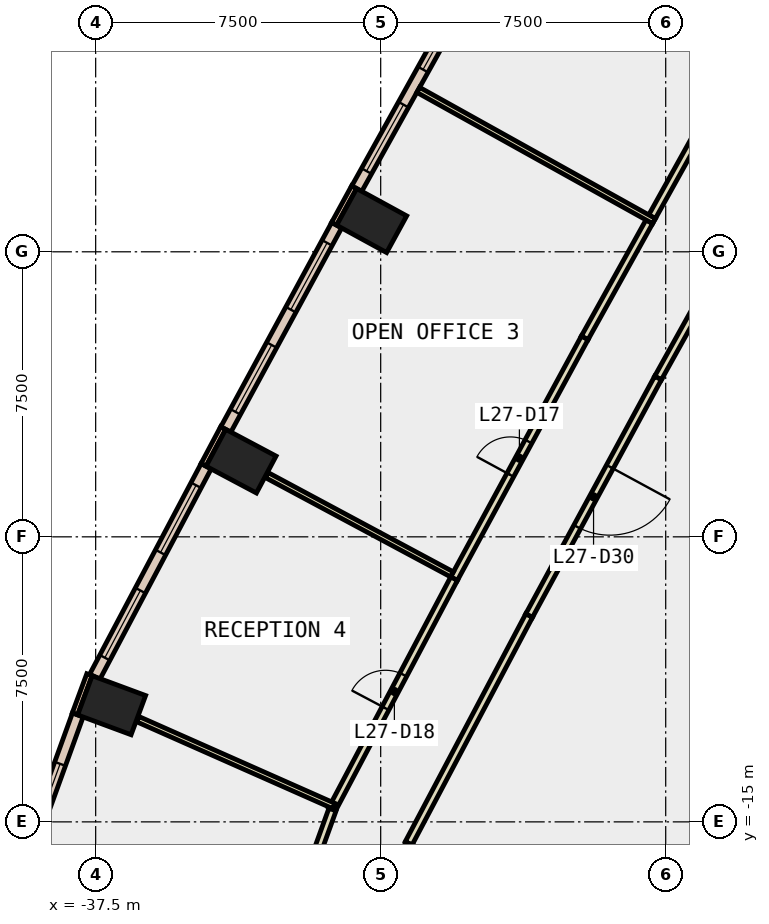
"""IFC4 building model, lengths in metres.
Left out: names, types, materials, properties, quantities, classifications, styles, units other than length and angle.
Written with IfcOpenShell. Run it as: python <this file> out.ifc"""

import sys

from ifc_helpers import new_model, si_unit, direction, frame, frame_2d, origin, origin_2d, place, context, subcontext, project, spatial, rectangle, extrude, element, fill, save


model = new_model("IFC4")
c1 = context("Model", 3, precision=1e-05, world=origin(), true_north=direction((0.0, 1.0)))
c2 = subcontext(c1, "Body", "Model", "MODEL_VIEW")
j1 = project(units=[si_unit("LENGTHUNIT", "METRE"), si_unit("PLANEANGLEUNIT", "RADIAN")], contexts=[c1])
p1 = place(None, origin())
s1 = spatial("IfcSite", under=j1, at=p1, CompositionType="ELEMENT")
p2 = place(p1, origin())
s2 = spatial("IfcBuilding", under=s1, at=p2, CompositionType="ELEMENT")
p3 = place(p2, frame((0.0, 0.0, 124.4)))
s3 = spatial("IfcBuildingStorey", under=s2, at=p3, CompositionType="ELEMENT", Elevation=124.4)
for number, where, z_axis, x_axis in (
    (1, (-30.238, 0.822, -0.4), (0.0, 0.0, 1.0), (0.48, 0.877, 0.0)),
    (2, (-33.674, -5.509, -0.4), (0.0, 0.0, 1.0), (0.469, 0.883, 0.0)),
    (3, (-37.08, -11.931, -0.4), (0.0, 0.0, 1.0), (0.347, 0.938, 0.0)),
):
    element("IfcColumn", number, at=place(p3, frame(where, z_axis=z_axis, x_axis=x_axis)), inside=s3, PredefinedType="COLUMN", context=c2, shape_type="SweptSolid", body=[
        extrude(rectangle(XDim=1.1, YDim=1.5, at=origin_2d()), origin(), (0.0, 0.0, 1.0), 4.2),
    ])
p4 = place(p3, frame((-30.698, 1.701, 0.0), z_axis=(0.0, 0.0, 1.0), x_axis=(-0.479737645119, -0.877411985247, 0.0)))
e4 = element("IfcWall", 4, at=p4, inside=s3, PredefinedType="STANDARD", context=c2, shape_type="SweptSolid", body=[
    extrude(rectangle(XDim=1.101, YDim=0.15, at=frame_2d((0.55, 0.0))), origin(), (0.0, 0.0, 1.0), 3.8),
])
p5 = place(p3, frame((-34.145, -4.637, 0.0), z_axis=(0.0, 0.0, 1.0), x_axis=(-0.46919310775, -0.883095593716, 0.0)))
e5 = element("IfcWall", 5, at=p5, inside=s3, PredefinedType="STANDARD", context=c2, shape_type="SweptSolid", body=[
    extrude(rectangle(XDim=1.099, YDim=0.15, at=frame_2d((0.55, 0.0))), origin(), (0.0, 0.0, 1.0), 3.8),
])
p6 = place(p3, frame((-37.663, -11.128, 0.0), z_axis=(0.0, 0.0, 1.0), x_axis=(-0.347010833361, -0.937861120598, 0.0)))
e6 = element("IfcWall", 6, at=p6, inside=s3, PredefinedType="STANDARD", context=c2, shape_type="SweptSolid", body=[
    extrude(rectangle(XDim=1.1, YDim=0.15, at=frame_2d((0.55, 0.0))), origin(), (0.0, 0.0, 1.0), 3.8),
])
p7 = place(p3, frame((-27.656, 7.005, 0.0), z_axis=(0.0, 0.0, 1.0), x_axis=(-0.486229342917, -0.873831234327, 0.0)))
e7 = element("IfcWall", 7, at=p7, inside=s3, PredefinedType="STANDARD", context=c2, shape_type="SweptSolid", body=[
    extrude(rectangle(XDim=6.114, YDim=0.3, at=frame_2d((3.057, 0.0))), origin(), (0.0, 0.0, 1.0), 3.8),
])
p8 = place(p7, frame((0.529, 0.0, 0.9)))
e8 = element("IfcOpeningElement", 8, at=p8, cuts=e7, PredefinedType="OPENING", context=c2, shape_type="SweptSolid", body=[
    extrude(rectangle(XDim=2.0, YDim=2.6, at=frame_2d((1.0, 1.3))), frame((0.0, 0.16, 0.0), z_axis=(0.0, -1.0, 0.0), x_axis=(1.0, 0.0, 0.0)), (0.0, 0.0, 1.0), 0.32),
])
p9 = place(p7, frame((3.586, 0.0, 0.9)))
e9 = element("IfcOpeningElement", 9, at=p9, cuts=e7, PredefinedType="OPENING", context=c2, shape_type="SweptSolid", body=[
    extrude(rectangle(XDim=2.0, YDim=2.6, at=frame_2d((1.0, 1.3))), frame((0.0, 0.16, 0.0), z_axis=(0.0, -1.0, 0.0), x_axis=(1.0, 0.0, 0.0)), (0.0, 0.0, 1.0), 0.32),
])
p10 = place(p3, frame((-31.158, 0.7, 0.0), z_axis=(0.0, 0.0, 1.0), x_axis=(-0.476982616152, -0.878912728255, 0.0)))
e10 = element("IfcWall", 10, at=p10, inside=s3, PredefinedType="STANDARD", context=c2, shape_type="SweptSolid", body=[
    extrude(rectangle(XDim=6.115, YDim=0.3, at=frame_2d((3.058, 0.0))), origin(), (0.0, 0.0, 1.0), 3.8),
])
p11 = place(p10, frame((0.529, 0.0, 0.9)))
e11 = element("IfcOpeningElement", 11, at=p11, cuts=e10, PredefinedType="OPENING", context=c2, shape_type="SweptSolid", body=[
    extrude(rectangle(XDim=2.0, YDim=2.6, at=frame_2d((1.0, 1.3))), frame((0.0, 0.16, 0.0), z_axis=(0.0, -1.0, 0.0), x_axis=(1.0, 0.0, 0.0)), (0.0, 0.0, 1.0), 0.32),
])
p12 = place(p10, frame((3.587, 0.0, 0.9)))
e12 = element("IfcOpeningElement", 12, at=p12, cuts=e10, PredefinedType="OPENING", context=c2, shape_type="SweptSolid", body=[
    extrude(rectangle(XDim=2.0, YDim=2.6, at=frame_2d((1.0, 1.3))), frame((0.0, 0.16, 0.0), z_axis=(0.0, -1.0, 0.0), x_axis=(1.0, 0.0, 0.0)), (0.0, 0.0, 1.0), 0.32),
])
p13 = place(p3, frame((-34.593, -5.643, 0.0), z_axis=(0.0, 0.0, 1.0), x_axis=(-0.467654949391, -0.883911108828, 0.0)))
e13 = element("IfcWall", 13, at=p13, inside=s3, PredefinedType="STANDARD", context=c2, shape_type="SweptSolid", body=[
    extrude(rectangle(XDim=6.265, YDim=0.3, at=frame_2d((3.133, 0.0))), origin(), (0.0, 0.0, 1.0), 3.8),
])
p14 = place(p13, frame((0.566, 0.0, 0.9)))
e14 = element("IfcOpeningElement", 14, at=p14, cuts=e13, PredefinedType="OPENING", context=c2, shape_type="SweptSolid", body=[
    extrude(rectangle(XDim=2.0, YDim=2.6, at=frame_2d((1.0, 1.3))), frame((0.0, 0.16, 0.0), z_axis=(0.0, -1.0, 0.0), x_axis=(1.0, 0.0, 0.0)), (0.0, 0.0, 1.0), 0.32),
])
p15 = place(p13, frame((3.699, 0.0, 0.9)))
e15 = element("IfcOpeningElement", 15, at=p15, cuts=e13, PredefinedType="OPENING", context=c2, shape_type="SweptSolid", body=[
    extrude(rectangle(XDim=2.0, YDim=2.6, at=frame_2d((1.0, 1.3))), frame((0.0, 0.16, 0.0), z_axis=(0.0, -1.0, 0.0), x_axis=(1.0, 0.0, 0.0)), (0.0, 0.0, 1.0), 0.32),
])
p16 = place(p3, frame((-37.97, -12.186, 0.0), z_axis=(0.0, 0.0, 1.0), x_axis=(-0.340477955209, -0.940252499075, 0.0)))
e16 = element("IfcWall", 16, at=p16, inside=s3, PredefinedType="STANDARD", context=c2, shape_type="SweptSolid", body=[
    extrude(rectangle(XDim=4.138, YDim=0.3, at=frame_2d((2.069, 0.0))), origin(), (0.0, 0.0, 1.0), 3.8),
])
p17 = place(p16, frame((1.369, 0.0, 0.9)))
e17 = element("IfcOpeningElement", 17, at=p17, cuts=e16, PredefinedType="OPENING", context=c2, shape_type="SweptSolid", body=[
    extrude(rectangle(XDim=1.4, YDim=2.6, at=frame_2d((0.7, 1.3))), frame((0.0, 0.16, 0.0), z_axis=(0.0, -1.0, 0.0), x_axis=(1.0, 0.0, 0.0)), (0.0, 0.0, 1.0), 0.32),
])
p18 = place(p3, frame((-19.243, 2.894, 0.0), z_axis=(0.0, 0.0, 1.0), x_axis=(-0.486304341235, -0.873789498504, 0.0)))
e18 = element("IfcWall", 18, at=p18, inside=s3, PredefinedType="PARTITIONING", context=c2, shape_type="SweptSolid", body=[
    extrude(rectangle(XDim=7.113, YDim=0.2, at=frame_2d((3.556, 0.0))), origin(), (0.0, 0.0, 1.0), 3.8),
])
p19 = place(p3, frame((-22.702, -3.321, 0.0), z_axis=(0.0, 0.0, 1.0), x_axis=(-0.476941907079, -0.878934819695, 0.0)))
e19 = element("IfcWall", 19, at=p19, inside=s3, PredefinedType="PARTITIONING", context=c2, shape_type="SweptSolid", body=[
    extrude(rectangle(XDim=7.114, YDim=0.2, at=frame_2d((3.557, 0.0))), origin(), (0.0, 0.0, 1.0), 3.8),
])
p20 = place(p19, frame((2.657, 0.0, 0.0)))
e20 = element("IfcOpeningElement", 20, at=p20, cuts=e19, PredefinedType="OPENING", context=c2, shape_type="SweptSolid", body=[
    extrude(rectangle(XDim=1.8, YDim=2.1, at=frame_2d((0.9, 1.05))), frame((0.0, 0.11, 0.0), z_axis=(0.0, -1.0, 0.0), x_axis=(1.0, 0.0, 0.0)), (0.0, 0.0, 1.0), 0.22),
])
p21 = place(p3, frame((-26.095, -9.574, 0.0), z_axis=(0.0, 0.0, 1.0), x_axis=(-0.467631129673, -0.883923710826, 0.0)))
e21 = element("IfcWall", 21, at=p21, inside=s3, PredefinedType="PARTITIONING", context=c2, shape_type="SweptSolid", body=[
    extrude(rectangle(XDim=6.777, YDim=0.2, at=frame_2d((3.388, 0.0))), origin(), (0.0, 0.0, 1.0), 3.8),
])
p22 = place(p3, frame((-29.251, -15.569, 0.0), z_axis=(0.0, 0.0, 1.0), x_axis=(-0.340403936609, -0.940279298901, 0.0)))
e22 = element("IfcWall", 22, at=p22, inside=s3, PredefinedType="PARTITIONING", context=c2, shape_type="SweptSolid", body=[
    extrude(rectangle(XDim=1.904, YDim=0.2, at=frame_2d((0.952, 0.0))), origin(), (0.0, 0.0, 1.0), 3.8),
])
p23 = place(p3, frame((-22.859, 0.922, 0.0), z_axis=(0.0, 0.0, 1.0), x_axis=(0.486390484578, 0.873741550181, 0.0)))
e23 = element("IfcWall", 23, at=p23, inside=s3, PredefinedType="PARTITIONING", context=c2, shape_type="SweptSolid", body=[
    extrude(rectangle(XDim=3.493, YDim=0.2, at=frame_2d((1.747, 0.0))), origin(), (0.0, 0.0, 1.0), 3.8),
])
p24 = place(p3, frame((-28.07, -8.601, 0.0), z_axis=(0.0, 0.0, 1.0), x_axis=(0.476979808397, 0.878914252007, 0.0)))
e24 = element("IfcWall", 24, at=p24, inside=s3, PredefinedType="PARTITIONING", context=c2, shape_type="SweptSolid", body=[
    extrude(rectangle(XDim=7.212, YDim=0.2, at=frame_2d((3.606, 0.0))), origin(), (0.0, 0.0, 1.0), 3.8),
])
p25 = place(p24, frame((3.106, 0.0, 0.0)))
e25 = element("IfcOpeningElement", 25, at=p25, cuts=e24, PredefinedType="OPENING", context=c2, shape_type="SweptSolid", body=[
    extrude(rectangle(XDim=1.0, YDim=2.1, at=frame_2d((0.5, 1.05))), frame((0.0, 0.11, 0.0), z_axis=(0.0, -1.0, 0.0), x_axis=(1.0, 0.0, 0.0)), (0.0, 0.0, 1.0), 0.22),
])
p26 = place(p3, frame((-24.63, -2.262, 0.0), z_axis=(0.0, 0.0, 1.0), x_axis=(0.486058237491, 0.873926421255, 0.0)))
e26 = element("IfcWall", 26, at=p26, inside=s3, PredefinedType="PARTITIONING", context=c2, shape_type="SweptSolid", body=[
    extrude(rectangle(XDim=3.493, YDim=0.2, at=frame_2d((1.747, 0.0))), origin(), (0.0, 0.0, 1.0), 3.8),
])
p27 = place(p3, frame((-31.28, -14.67, 0.0), z_axis=(0.0, 0.0, 1.0), x_axis=(0.4676622466, 0.883907248022, 0.0)))
e27 = element("IfcWall", 27, at=p27, inside=s3, PredefinedType="PARTITIONING", context=c2, shape_type="SweptSolid", body=[
    extrude(rectangle(XDim=6.866, YDim=0.2, at=frame_2d((3.433, 0.0))), origin(), (0.0, 0.0, 1.0), 3.8),
])
p28 = place(p27, frame((3.008, 0.0, 0.0)))
e28 = element("IfcOpeningElement", 28, at=p28, cuts=e27, PredefinedType="OPENING", context=c2, shape_type="SweptSolid", body=[
    extrude(rectangle(XDim=1.0, YDim=2.1, at=frame_2d((0.5, 1.05))), frame((0.0, 0.11, 0.0), z_axis=(0.0, -1.0, 0.0), x_axis=(1.0, 0.0, 0.0)), (0.0, 0.0, 1.0), 0.22),
])
p29 = place(p3, frame((-32.192, -17.229, 0.0), z_axis=(0.0, 0.0, 1.0), x_axis=(0.340269739222, 0.940327870782, 0.0)))
e29 = element("IfcWall", 29, at=p29, inside=s3, PredefinedType="PARTITIONING", context=c2, shape_type="SweptSolid", body=[
    extrude(rectangle(XDim=2.715, YDim=0.2, at=frame_2d((1.357, 0.0))), origin(), (0.0, 0.0, 1.0), 3.8),
])
p30 = place(p3, frame((-22.808, 0.808, 0.0), z_axis=(0.0, 0.0, 1.0), x_axis=(-0.873839159938, 0.486215099066, 0.0)))
e30 = element("IfcWall", 30, at=p30, inside=s3, PredefinedType="PARTITIONING", context=c2, shape_type="SweptSolid", body=[
    extrude(rectangle(XDim=7.1, YDim=0.15, at=frame_2d((3.55, 0.0))), origin(), (0.0, 0.0, 1.0), 3.8),
])
p31 = place(p3, frame((-28.123, -8.488, 0.0), z_axis=(0.0, 0.0, 1.0), x_axis=(-0.881406449288, 0.472358625573, 0.0)))
e31 = element("IfcWall", 31, at=p31, inside=s3, PredefinedType="PARTITIONING", context=c2, shape_type="SweptSolid", body=[
    extrude(rectangle(XDim=5.53, YDim=0.15, at=frame_2d((2.765, 0.0))), origin(), (0.0, 0.0, 1.0), 3.8),
])
p32 = place(p3, frame((-31.233, -14.582, 0.0), z_axis=(0.0, 0.0, 1.0), x_axis=(-0.914317360249, 0.404998474994, 0.0)))
e32 = element("IfcWall", 32, at=p32, inside=s3, PredefinedType="PARTITIONING", context=c2, shape_type="SweptSolid", body=[
    extrude(rectangle(XDim=5.645, YDim=0.15, at=frame_2d((2.822, 0.0))), origin(), (0.0, 0.0, 1.0), 3.8),
])
p33 = place(p8, origin())
e33 = element("IfcWindow", 33, at=p33, inside=s3, PartitioningType="SINGLE_PANEL", PredefinedType="WINDOW", context=c2, shape_type="SweptSolid", body=[
    extrude(rectangle(XDim=2.0, YDim=2.6, at=frame_2d((1.0, 1.3))), frame((0.0, 0.03, 0.0), z_axis=(0.0, -1.0, 0.0), x_axis=(1.0, 0.0, 0.0)), (0.0, 0.0, 1.0), 0.06),
])
fill(e8, e33)
p34 = place(p9, origin())
e34 = element("IfcWindow", 34, at=p34, inside=s3, PartitioningType="SINGLE_PANEL", PredefinedType="WINDOW", context=c2, shape_type="SweptSolid", body=[
    extrude(rectangle(XDim=2.0, YDim=2.6, at=frame_2d((1.0, 1.3))), frame((0.0, 0.03, 0.0), z_axis=(0.0, -1.0, 0.0), x_axis=(1.0, 0.0, 0.0)), (0.0, 0.0, 1.0), 0.06),
])
fill(e9, e34)
p35 = place(p11, origin())
e35 = element("IfcWindow", 35, at=p35, inside=s3, PartitioningType="SINGLE_PANEL", PredefinedType="WINDOW", context=c2, shape_type="SweptSolid", body=[
    extrude(rectangle(XDim=2.0, YDim=2.6, at=frame_2d((1.0, 1.3))), frame((0.0, 0.03, 0.0), z_axis=(0.0, -1.0, 0.0), x_axis=(1.0, 0.0, 0.0)), (0.0, 0.0, 1.0), 0.06),
])
fill(e11, e35)
p36 = place(p12, origin())
e36 = element("IfcWindow", 36, at=p36, inside=s3, PartitioningType="SINGLE_PANEL", PredefinedType="WINDOW", context=c2, shape_type="SweptSolid", body=[
    extrude(rectangle(XDim=2.0, YDim=2.6, at=frame_2d((1.0, 1.3))), frame((0.0, 0.03, 0.0), z_axis=(0.0, -1.0, 0.0), x_axis=(1.0, 0.0, 0.0)), (0.0, 0.0, 1.0), 0.06),
])
fill(e12, e36)
p37 = place(p14, origin())
e37 = element("IfcWindow", 37, at=p37, inside=s3, PartitioningType="SINGLE_PANEL", PredefinedType="WINDOW", context=c2, shape_type="SweptSolid", body=[
    extrude(rectangle(XDim=2.0, YDim=2.6, at=frame_2d((1.0, 1.3))), frame((0.0, 0.03, 0.0), z_axis=(0.0, -1.0, 0.0), x_axis=(1.0, 0.0, 0.0)), (0.0, 0.0, 1.0), 0.06),
])
fill(e14, e37)
p38 = place(p15, origin())
e38 = element("IfcWindow", 38, at=p38, inside=s3, PartitioningType="SINGLE_PANEL", PredefinedType="WINDOW", context=c2, shape_type="SweptSolid", body=[
    extrude(rectangle(XDim=2.0, YDim=2.6, at=frame_2d((1.0, 1.3))), frame((0.0, 0.03, 0.0), z_axis=(0.0, -1.0, 0.0), x_axis=(1.0, 0.0, 0.0)), (0.0, 0.0, 1.0), 0.06),
])
fill(e15, e38)
p39 = place(p17, origin())
e39 = element("IfcWindow", 39, at=p39, inside=s3, PartitioningType="SINGLE_PANEL", PredefinedType="WINDOW", context=c2, shape_type="SweptSolid", body=[
    extrude(rectangle(XDim=1.4, YDim=2.6, at=frame_2d((0.7, 1.3))), frame((0.0, 0.03, 0.0), z_axis=(0.0, -1.0, 0.0), x_axis=(1.0, 0.0, 0.0)), (0.0, 0.0, 1.0), 0.06),
])
fill(e17, e39)
p40 = place(p25, origin())
e40 = element("IfcDoor", 40, at=p40, inside=s3, OperationType="SINGLE_SWING_RIGHT", PredefinedType="DOOR", context=c2, shape_type="SweptSolid", body=[
    extrude(rectangle(XDim=1.0, YDim=2.1, at=frame_2d((0.5, 1.05))), frame((0.0, 0.025, 0.0), z_axis=(0.0, -1.0, 0.0), x_axis=(1.0, 0.0, 0.0)), (0.0, 0.0, 1.0), 0.05),
])
fill(e25, e40)
p41 = place(p28, origin())
e41 = element("IfcDoor", 41, at=p41, inside=s3, OperationType="SINGLE_SWING_LEFT", PredefinedType="DOOR", context=c2, shape_type="SweptSolid", body=[
    extrude(rectangle(XDim=1.0, YDim=2.1, at=frame_2d((0.5, 1.05))), frame((0.0, 0.025, 0.0), z_axis=(0.0, -1.0, 0.0), x_axis=(1.0, 0.0, 0.0)), (0.0, 0.0, 1.0), 0.05),
])
fill(e28, e41)
p42 = place(p20, origin())
e42 = element("IfcDoor", 42, at=p42, inside=s3, OperationType="DOUBLE_DOOR_SINGLE_SWING", PredefinedType="DOOR", context=c2, shape_type="SweptSolid", body=[
    extrude(rectangle(XDim=1.8, YDim=2.1, at=frame_2d((0.9, 1.05))), frame((0.0, 0.025, 0.0), z_axis=(0.0, -1.0, 0.0), x_axis=(1.0, 0.0, 0.0)), (0.0, 0.0, 1.0), 0.05),
])
fill(e20, e42)
save(model, sys.argv[1])
